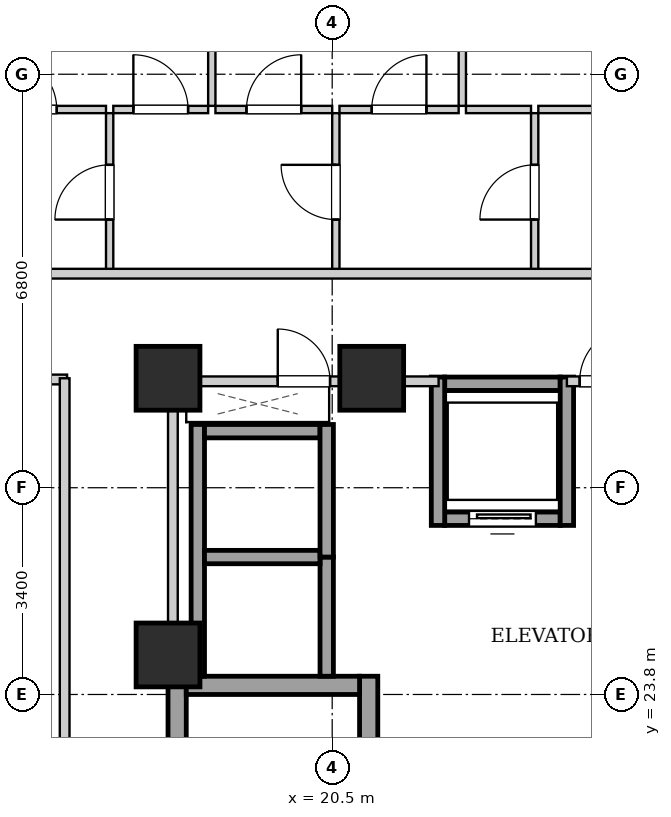
"""IFC4 building model, lengths in metres.
Left out: names, types, materials, properties, quantities, classifications, styles, units other than length and angle.
Written with IfcOpenShell. Run it as: python <this file> out.ifc"""

import sys

from ifc_helpers import new_model, si_unit, direction, frame, frame_2d, origin, origin_2d, place, context, subcontext, project, spatial, rectangle, extrude, element, fill, save


model = new_model("IFC4")
c1 = context("Model", 3, precision=1e-05, world=origin(), true_north=direction((0.0, 1.0)))
c2 = subcontext(c1, "Body", "Model", "MODEL_VIEW")
j1 = project(units=[si_unit("LENGTHUNIT", "METRE"), si_unit("PLANEANGLEUNIT", "RADIAN")], contexts=[c1])
p1 = place(None, origin())
s1 = spatial("IfcSite", under=j1, at=p1, CompositionType="ELEMENT")
p2 = place(p1, origin())
s2 = spatial("IfcBuilding", under=s1, at=p2, CompositionType="ELEMENT")
p3 = place(p2, frame((0.0, 0.0, 75.1)))
s3 = spatial("IfcBuildingStorey", under=s2, at=p3, CompositionType="ELEMENT", Elevation=75.1)
for number, where, z_axis, x_axis in (
    (1, (17.8, 29.0, 0.0), (0.0, 0.0, 1.0), (1.0, 0.0, 0.0)),
    (2, (21.15, 29.0, 0.0), (0.0, 0.0, 1.0), (1.0, 0.0, 0.0)),
    (3, (17.8, 24.45, 0.0), (0.0, 0.0, 1.0), (1.0, 0.0, 0.0)),
):
    element("IfcColumn", number, at=place(p3, frame(where, z_axis=z_axis, x_axis=x_axis)), inside=s3, PredefinedType="COLUMN", context=c2, shape_type="SweptSolid", body=[
        extrude(rectangle(XDim=1.05, YDim=1.05, at=origin_2d()), origin(), (0.0, 0.0, 1.0), 3.2),
    ])
for number, where, z_axis, x_axis in (
    (4, (17.95, 15.1, 0.0), (0.0, 0.0, 1.0), (0.0, 1.0, 0.0)),
    (5, (21.1, 15.1, 0.0), (0.0, 0.0, 1.0), (0.0, 1.0, 0.0)),
):
    element("IfcWall", number, at=place(p3, frame(where, z_axis=z_axis, x_axis=x_axis)), inside=s3, PredefinedType="SHEAR", context=c2, shape_type="SweptSolid", body=[
        extrude(rectangle(XDim=9.0, YDim=0.3, at=frame_2d((4.5, 0.0))), origin(), (0.0, 0.0, 1.0), 2.94),
    ])
p4 = place(p3, frame((18.1, 23.95, 0.0), z_axis=(0.0, 0.0, 1.0), x_axis=(1.0, 0.0, 0.0)))
e6 = element("IfcWall", 6, at=p4, inside=s3, PredefinedType="SHEAR", context=c2, shape_type="SweptSolid", body=[
    extrude(rectangle(XDim=2.85, YDim=0.3, at=frame_2d((1.425, 0.0))), origin(), (0.0, 0.0, 1.0), 2.94),
])
p5 = place(p3, frame((22.35, 26.69, 0.0), z_axis=(0.0, 0.0, 1.0), x_axis=(1.0, 0.0, 0.0)))
e7 = element("IfcWall", 7, at=p5, inside=s3, PredefinedType="SHEAR", context=c2, shape_type="SweptSolid", body=[
    extrude(rectangle(XDim=1.9, YDim=0.22, at=frame_2d((0.95, 0.0))), origin(), (0.0, 0.0, 1.0), 2.94),
])
p6 = place(p5, frame((0.4, 0.0, 0.0)))
e8 = element("IfcOpeningElement", 8, at=p6, cuts=e7, PredefinedType="OPENING", context=c2, shape_type="SweptSolid", body=[
    extrude(rectangle(XDim=1.1, YDim=2.15, at=frame_2d((0.55, 1.075))), frame((0.0, 0.12, 0.0), z_axis=(0.0, -1.0, 0.0), x_axis=(1.0, 0.0, 0.0)), (0.0, 0.0, 1.0), 0.24),
])
p7 = place(p3, frame((22.35, 28.91, 0.0), z_axis=(0.0, 0.0, 1.0), x_axis=(1.0, 0.0, 0.0)))
e9 = element("IfcWall", 9, at=p7, inside=s3, PredefinedType="SHEAR", context=c2, shape_type="SweptSolid", body=[
    extrude(rectangle(XDim=1.9, YDim=0.22, at=frame_2d((0.95, 0.0))), origin(), (0.0, 0.0, 1.0), 2.94),
])
for number, where, z_axis, x_axis in (
    (10, (22.24, 26.58, 0.0), (0.0, 0.0, 1.0), (0.0, 1.0, 0.0)),
    (11, (24.36, 26.58, 0.0), (0.0, 0.0, 1.0), (0.0, 1.0, 0.0)),
):
    element("IfcWall", number, at=place(p3, frame(where, z_axis=z_axis, x_axis=x_axis)), inside=s3, PredefinedType="SHEAR", context=c2, shape_type="SweptSolid", body=[
        extrude(rectangle(XDim=2.44, YDim=0.22, at=frame_2d((1.22, 0.0))), origin(), (0.0, 0.0, 1.0), 2.94),
    ])
p8 = place(p3, frame((18.29, 24.1, 0.0), z_axis=(0.0, 0.0, 1.0), x_axis=(0.0, 1.0, 0.0)))
e12 = element("IfcWall", 12, at=p8, inside=s3, PredefinedType="SHEAR", context=c2, shape_type="SweptSolid", body=[
    extrude(rectangle(XDim=4.14, YDim=0.22, at=frame_2d((2.07, 0.0))), origin(), (0.0, 0.0, 1.0), 2.94),
])
p9 = place(p3, frame((20.41, 24.1, 0.0), z_axis=(0.0, 0.0, 1.0), x_axis=(0.0, 1.0, 0.0)))
e13 = element("IfcWall", 13, at=p9, inside=s3, PredefinedType="SHEAR", context=c2, shape_type="SweptSolid", body=[
    extrude(rectangle(XDim=1.96, YDim=0.22, at=frame_2d((0.98, 0.0))), origin(), (0.0, 0.0, 1.0), 2.94),
])
for number, where, z_axis, x_axis in (
    (14, (18.4, 26.06, 0.0), (0.0, 0.0, 1.0), (1.0, 0.0, 0.0)),
    (15, (18.4, 28.13, 0.0), (0.0, 0.0, 1.0), (1.0, 0.0, 0.0)),
):
    element("IfcWall", number, at=place(p3, frame(where, z_axis=z_axis, x_axis=x_axis)), inside=s3, PredefinedType="SHEAR", context=c2, shape_type="SweptSolid", body=[
        extrude(rectangle(XDim=1.9, YDim=0.22, at=frame_2d((0.95, 0.0))), origin(), (0.0, 0.0, 1.0), 2.94),
    ])
p10 = place(p3, frame((20.41, 26.06, 0.0), z_axis=(0.0, 0.0, 1.0), x_axis=(0.0, 1.0, 0.0)))
e16 = element("IfcWall", 16, at=p10, inside=s3, PredefinedType="SHEAR", context=c2, shape_type="SweptSolid", body=[
    extrude(rectangle(XDim=2.18, YDim=0.22, at=frame_2d((1.09, 0.0))), origin(), (0.0, 0.0, 1.0), 2.94),
])
p11 = place(p3, frame((17.88, 24.12, 0.0), z_axis=(0.0, 0.0, 1.0), x_axis=(0.0, 1.0, 0.0)))
e17 = element("IfcWall", 17, at=p11, inside=s3, PredefinedType="PARTITIONING", context=c2, shape_type="SweptSolid", body=[
    extrude(rectangle(XDim=4.76, YDim=0.16, at=frame_2d((2.38, 0.0))), origin(), (0.0, 0.0, 1.0), 2.94),
])
p12 = place(p3, frame((24.36, 28.95, 0.0), z_axis=(0.0, 0.0, 1.0), x_axis=(1.0, 0.0, 0.0)))
e18 = element("IfcWall", 18, at=p12, inside=s3, PredefinedType="PARTITIONING", context=c2, shape_type="SweptSolid", body=[
    extrude(rectangle(XDim=1.32, YDim=0.16, at=frame_2d((0.66, 0.0))), origin(), (0.0, 0.0, 1.0), 2.309),
])
p13 = place(p12, frame((0.21, 0.0, 0.0)))
e19 = element("IfcOpeningElement", 19, at=p13, cuts=e18, PredefinedType="OPENING", context=c2, shape_type="SweptSolid", body=[
    extrude(rectangle(XDim=0.9, YDim=2.05, at=frame_2d((0.45, 1.025))), frame((0.0, 0.09, 0.0), z_axis=(0.0, -1.0, 0.0), x_axis=(1.0, 0.0, 0.0)), (0.0, 0.0, 1.0), 0.18),
])
p14 = place(p3, frame((17.96, 28.95, 0.0), z_axis=(0.0, 0.0, 1.0), x_axis=(1.0, 0.0, 0.0)))
e20 = element("IfcWall", 20, at=p14, inside=s3, PredefinedType="PARTITIONING", context=c2, shape_type="SweptSolid", body=[
    extrude(rectangle(XDim=4.29, YDim=0.16, at=frame_2d((2.145, 0.0))), origin(), (0.0, 0.0, 1.0), 2.309),
])
p15 = place(p14, frame((1.645, 0.0, 0.0)))
e21 = element("IfcOpeningElement", 21, at=p15, cuts=e20, PredefinedType="OPENING", context=c2, shape_type="SweptSolid", body=[
    extrude(rectangle(XDim=0.86, YDim=2.05, at=frame_2d((0.43, 1.025))), frame((0.0, 0.09, 0.0), z_axis=(0.0, -1.0, 0.0), x_axis=(1.0, 0.0, 0.0)), (0.0, 0.0, 1.0), 0.18),
])
p16 = place(p3, frame((7.78, 28.98, 0.0), z_axis=(0.0, 0.0, 1.0), x_axis=(1.0, 0.0, 0.0)))
e22 = element("IfcWall", 22, at=p16, inside=s3, PredefinedType="PARTITIONING", context=c2, shape_type="SweptSolid", body=[
    extrude(rectangle(XDim=8.36, YDim=0.16, at=frame_2d((4.18, 0.0))), origin(), (0.0, 0.0, 1.0), 2.309),
])
p17 = place(p3, frame((16.84, 30.76, 0.0), z_axis=(0.0, 0.0, 1.0), x_axis=(0.0, 1.0, 0.0)))
e23 = element("IfcWall", 23, at=p17, inside=s3, PredefinedType="PARTITIONING", context=c2, shape_type="SweptSolid", body=[
    extrude(rectangle(XDim=2.6, YDim=0.12, at=frame_2d((1.3, 0.0))), origin(), (0.0, 0.0, 1.0), 2.94),
])
p18 = place(p17, frame((0.85, 0.0, 0.0)))
e24 = element("IfcOpeningElement", 24, at=p18, cuts=e23, PredefinedType="OPENING", context=c2, shape_type="SweptSolid", body=[
    extrude(rectangle(XDim=0.9, YDim=2.05, at=frame_2d((0.45, 1.025))), frame((0.0, 0.07, 0.0), z_axis=(0.0, -1.0, 0.0), x_axis=(1.0, 0.0, 0.0)), (0.0, 0.0, 1.0), 0.14),
])
p19 = place(p3, frame((14.26, 33.42, 0.0), z_axis=(0.0, 0.0, 1.0), x_axis=(1.0, 0.0, 0.0)))
e25 = element("IfcWall", 25, at=p19, inside=s3, PredefinedType="PARTITIONING", context=c2, shape_type="SweptSolid", body=[
    extrude(rectangle(XDim=2.52, YDim=0.12, at=frame_2d((1.26, 0.0))), origin(), (0.0, 0.0, 1.0), 2.94),
])
p20 = place(p19, frame((0.81, 0.0, 0.0)))
e26 = element("IfcOpeningElement", 26, at=p20, cuts=e25, PredefinedType="OPENING", context=c2, shape_type="SweptSolid", body=[
    extrude(rectangle(XDim=0.9, YDim=2.05, at=frame_2d((0.45, 1.025))), frame((0.0, 0.07, 0.0), z_axis=(0.0, -1.0, 0.0), x_axis=(1.0, 0.0, 0.0)), (0.0, 0.0, 1.0), 0.14),
])
p21 = place(p3, frame((20.56, 30.76, 0.0), z_axis=(0.0, 0.0, 1.0), x_axis=(0.0, 1.0, 0.0)))
e27 = element("IfcWall", 27, at=p21, inside=s3, PredefinedType="PARTITIONING", context=c2, shape_type="SweptSolid", body=[
    extrude(rectangle(XDim=2.6, YDim=0.12, at=frame_2d((1.3, 0.0))), origin(), (0.0, 0.0, 1.0), 2.94),
])
p22 = place(p21, frame((0.85, 0.0, 0.0)))
e28 = element("IfcOpeningElement", 28, at=p22, cuts=e27, PredefinedType="OPENING", context=c2, shape_type="SweptSolid", body=[
    extrude(rectangle(XDim=0.9, YDim=2.05, at=frame_2d((0.45, 1.025))), frame((0.0, 0.07, 0.0), z_axis=(0.0, -1.0, 0.0), x_axis=(1.0, 0.0, 0.0)), (0.0, 0.0, 1.0), 0.14),
])
p23 = place(p3, frame((16.9, 33.42, 0.0), z_axis=(0.0, 0.0, 1.0), x_axis=(1.0, 0.0, 0.0)))
e29 = element("IfcWall", 29, at=p23, inside=s3, PredefinedType="PARTITIONING", context=c2, shape_type="SweptSolid", body=[
    extrude(rectangle(XDim=1.56, YDim=0.12, at=frame_2d((0.78, 0.0))), origin(), (0.0, 0.0, 1.0), 2.94),
])
p24 = place(p23, frame((0.33, 0.0, 0.0)))
e30 = element("IfcOpeningElement", 30, at=p24, cuts=e29, PredefinedType="OPENING", context=c2, shape_type="SweptSolid", body=[
    extrude(rectangle(XDim=0.9, YDim=2.05, at=frame_2d((0.45, 1.025))), frame((0.0, 0.07, 0.0), z_axis=(0.0, -1.0, 0.0), x_axis=(1.0, 0.0, 0.0)), (0.0, 0.0, 1.0), 0.14),
])
p25 = place(p3, frame((18.58, 33.42, 0.0), z_axis=(0.0, 0.0, 1.0), x_axis=(1.0, 0.0, 0.0)))
e31 = element("IfcWall", 31, at=p25, inside=s3, PredefinedType="PARTITIONING", context=c2, shape_type="SweptSolid", body=[
    extrude(rectangle(XDim=1.92, YDim=0.12, at=frame_2d((0.96, 0.0))), origin(), (0.0, 0.0, 1.0), 2.94),
])
p26 = place(p25, frame((0.51, 0.0, 0.0)))
e32 = element("IfcOpeningElement", 32, at=p26, cuts=e31, PredefinedType="OPENING", context=c2, shape_type="SweptSolid", body=[
    extrude(rectangle(XDim=0.9, YDim=2.05, at=frame_2d((0.45, 1.025))), frame((0.0, 0.07, 0.0), z_axis=(0.0, -1.0, 0.0), x_axis=(1.0, 0.0, 0.0)), (0.0, 0.0, 1.0), 0.14),
])
p27 = place(p3, frame((23.83, 30.76, 0.0), z_axis=(0.0, 0.0, 1.0), x_axis=(0.0, 1.0, 0.0)))
e33 = element("IfcWall", 33, at=p27, inside=s3, PredefinedType="PARTITIONING", context=c2, shape_type="SweptSolid", body=[
    extrude(rectangle(XDim=2.6, YDim=0.12, at=frame_2d((1.3, 0.0))), origin(), (0.0, 0.0, 1.0), 2.94),
])
p28 = place(p27, frame((0.85, 0.0, 0.0)))
e34 = element("IfcOpeningElement", 34, at=p28, cuts=e33, PredefinedType="OPENING", context=c2, shape_type="SweptSolid", body=[
    extrude(rectangle(XDim=0.9, YDim=2.05, at=frame_2d((0.45, 1.025))), frame((0.0, 0.07, 0.0), z_axis=(0.0, -1.0, 0.0), x_axis=(1.0, 0.0, 0.0)), (0.0, 0.0, 1.0), 0.14),
])
p29 = place(p3, frame((20.62, 33.42, 0.0), z_axis=(0.0, 0.0, 1.0), x_axis=(1.0, 0.0, 0.0)))
e35 = element("IfcWall", 35, at=p29, inside=s3, PredefinedType="PARTITIONING", context=c2, shape_type="SweptSolid", body=[
    extrude(rectangle(XDim=1.96, YDim=0.12, at=frame_2d((0.98, 0.0))), origin(), (0.0, 0.0, 1.0), 2.94),
])
p30 = place(p29, frame((0.53, 0.0, 0.0)))
e36 = element("IfcOpeningElement", 36, at=p30, cuts=e35, PredefinedType="OPENING", context=c2, shape_type="SweptSolid", body=[
    extrude(rectangle(XDim=0.9, YDim=2.05, at=frame_2d((0.45, 1.025))), frame((0.0, 0.07, 0.0), z_axis=(0.0, -1.0, 0.0), x_axis=(1.0, 0.0, 0.0)), (0.0, 0.0, 1.0), 0.14),
])
p31 = place(p3, frame((22.7, 33.42, 0.0), z_axis=(0.0, 0.0, 1.0), x_axis=(1.0, 0.0, 0.0)))
e37 = element("IfcWall", 37, at=p31, inside=s3, PredefinedType="PARTITIONING", context=c2, shape_type="SweptSolid", body=[
    extrude(rectangle(XDim=1.07, YDim=0.12, at=frame_2d((0.535, 0.0))), origin(), (0.0, 0.0, 1.0), 2.94),
])
p32 = place(p3, frame((23.89, 33.42, 0.0), z_axis=(0.0, 0.0, 1.0), x_axis=(1.0, 0.0, 0.0)))
e38 = element("IfcWall", 38, at=p32, inside=s3, PredefinedType="PARTITIONING", context=c2, shape_type="SweptSolid", body=[
    extrude(rectangle(XDim=3.6, YDim=0.12, at=frame_2d((1.8, 0.0))), origin(), (0.0, 0.0, 1.0), 2.94),
])
p33 = place(p32, frame((1.35, 0.0, 0.0)))
e39 = element("IfcOpeningElement", 39, at=p33, cuts=e38, PredefinedType="OPENING", context=c2, shape_type="SweptSolid", body=[
    extrude(rectangle(XDim=0.9, YDim=2.05, at=frame_2d((0.45, 1.025))), frame((0.0, 0.07, 0.0), z_axis=(0.0, -1.0, 0.0), x_axis=(1.0, 0.0, 0.0)), (0.0, 0.0, 1.0), 0.14),
])
p34 = place(p3, frame((18.52, 33.48, 0.0), z_axis=(0.0, 0.0, 1.0), x_axis=(0.0, 1.0, 0.0)))
e40 = element("IfcWall", 40, at=p34, inside=s3, PredefinedType="PARTITIONING", context=c2, shape_type="SweptSolid", body=[
    extrude(rectangle(XDim=9.54, YDim=0.12, at=frame_2d((4.77, 0.0))), origin(), (0.0, 0.0, 1.0), 2.94),
])
p35 = place(p34, frame((4.305, 0.0, 0.0)))
e41 = element("IfcOpeningElement", 41, at=p35, cuts=e40, PredefinedType="OPENING", context=c2, shape_type="SweptSolid", body=[
    extrude(rectangle(XDim=0.9, YDim=2.05, at=frame_2d((0.45, 1.025))), frame((0.0, 0.07, 0.0), z_axis=(0.0, -1.0, 0.0), x_axis=(1.0, 0.0, 0.0)), (0.0, 0.0, 1.0), 0.14),
])
p36 = place(p3, frame((22.64, 33.48, 0.0), z_axis=(0.0, 0.0, 1.0), x_axis=(0.0, 1.0, 0.0)))
e42 = element("IfcWall", 42, at=p36, inside=s3, PredefinedType="PARTITIONING", context=c2, shape_type="SweptSolid", body=[
    extrude(rectangle(XDim=9.54, YDim=0.12, at=frame_2d((4.77, 0.0))), origin(), (0.0, 0.0, 1.0), 2.94),
])
p37 = place(p36, frame((4.305, 0.0, 0.0)))
e43 = element("IfcOpeningElement", 43, at=p37, cuts=e42, PredefinedType="OPENING", context=c2, shape_type="SweptSolid", body=[
    extrude(rectangle(XDim=0.9, YDim=2.05, at=frame_2d((0.45, 1.025))), frame((0.0, 0.07, 0.0), z_axis=(0.0, -1.0, 0.0), x_axis=(1.0, 0.0, 0.0)), (0.0, 0.0, 1.0), 0.14),
])
p38 = place(p3, frame((10.05, 30.72, 0.0), z_axis=(0.0, 0.0, 1.0), x_axis=(1.0, 0.0, 0.0)))
e44 = element("IfcWall", 44, at=p38, inside=s3, PredefinedType="PARTITIONING", context=c2, shape_type="SweptSolid", body=[
    extrude(rectangle(XDim=30.8, YDim=0.16, at=frame_2d((15.4, 0.0))), origin(), (0.0, 0.0, 1.0), 2.94),
])
p39 = place(p38, frame((4.165, 0.0, 0.0)))
e45 = element("IfcOpeningElement", 45, at=p39, cuts=e44, PredefinedType="OPENING", context=c2, shape_type="SweptSolid", body=[
    extrude(rectangle(XDim=0.95, YDim=2.1, at=frame_2d((0.475, 1.05))), frame((0.0, 0.09, 0.0), z_axis=(0.0, -1.0, 0.0), x_axis=(1.0, 0.0, 0.0)), (0.0, 0.0, 1.0), 0.18),
])
p40 = place(p3, frame((16.1, 15.07, 0.0), z_axis=(0.0, 0.0, 1.0), x_axis=(0.0, 1.0, 0.0)))
e46 = element("IfcWall", 46, at=p40, inside=s3, PredefinedType="PARTITIONING", context=c2, shape_type="SweptSolid", body=[
    extrude(rectangle(XDim=13.93, YDim=0.16, at=frame_2d((6.965, 0.0))), origin(), (0.0, 0.0, 1.0), 2.94),
])
p41 = place(p40, frame((4.385, 0.0, 0.0)))
e47 = element("IfcOpeningElement", 47, at=p41, cuts=e46, PredefinedType="OPENING", context=c2, shape_type="SweptSolid", body=[
    extrude(rectangle(XDim=0.95, YDim=2.1, at=frame_2d((0.475, 1.05))), frame((0.0, 0.09, 0.0), z_axis=(0.0, -1.0, 0.0), x_axis=(1.0, 0.0, 0.0)), (0.0, 0.0, 1.0), 0.18),
])
p42 = place(p6, origin())
e48 = element("IfcDoor", 48, at=p42, inside=s3, OperationType="SLIDING_TO_LEFT", PredefinedType="DOOR", context=c2, shape_type="SweptSolid", body=[
    extrude(rectangle(XDim=1.1, YDim=2.15, at=frame_2d((0.55, 1.075))), frame((0.0, 0.025, 0.0), z_axis=(0.0, -1.0, 0.0), x_axis=(1.0, 0.0, 0.0)), (0.0, 0.0, 1.0), 0.05),
])
fill(e8, e48)
p43 = place(p13, origin())
e49 = element("IfcDoor", 49, at=p43, inside=s3, OperationType="SINGLE_SWING_RIGHT", PredefinedType="DOOR", context=c2, shape_type="SweptSolid", body=[
    extrude(rectangle(XDim=0.9, YDim=2.05, at=frame_2d((0.45, 1.025))), frame((0.0, 0.025, 0.0), z_axis=(0.0, -1.0, 0.0), x_axis=(1.0, 0.0, 0.0)), (0.0, 0.0, 1.0), 0.05),
])
fill(e19, e49)
p44 = place(p15, origin())
e50 = element("IfcDoor", 50, at=p44, inside=s3, OperationType="SINGLE_SWING_LEFT", PredefinedType="DOOR", context=c2, shape_type="SweptSolid", body=[
    extrude(rectangle(XDim=0.86, YDim=2.05, at=frame_2d((0.43, 1.025))), frame((0.0, 0.025, 0.0), z_axis=(0.0, -1.0, 0.0), x_axis=(1.0, 0.0, 0.0)), (0.0, 0.0, 1.0), 0.05),
])
fill(e21, e50)
p45 = place(p18, origin())
e51 = element("IfcDoor", 51, at=p45, inside=s3, OperationType="SINGLE_SWING_LEFT", PredefinedType="DOOR", context=c2, shape_type="SweptSolid", body=[
    extrude(rectangle(XDim=0.9, YDim=2.05, at=frame_2d((0.45, 1.025))), frame((0.0, 0.025, 0.0), z_axis=(0.0, -1.0, 0.0), x_axis=(1.0, 0.0, 0.0)), (0.0, 0.0, 1.0), 0.05),
])
fill(e24, e51)
p46 = place(p20, origin())
e52 = element("IfcDoor", 52, at=p46, inside=s3, OperationType="SINGLE_SWING_LEFT", PredefinedType="DOOR", context=c2, shape_type="SweptSolid", body=[
    extrude(rectangle(XDim=0.9, YDim=2.05, at=frame_2d((0.45, 1.025))), frame((0.0, 0.025, 0.0), z_axis=(0.0, -1.0, 0.0), x_axis=(1.0, 0.0, 0.0)), (0.0, 0.0, 1.0), 0.05),
])
fill(e26, e52)
p47 = place(p22, origin())
e53 = element("IfcDoor", 53, at=p47, inside=s3, OperationType="SINGLE_SWING_RIGHT", PredefinedType="DOOR", context=c2, shape_type="SweptSolid", body=[
    extrude(rectangle(XDim=0.9, YDim=2.05, at=frame_2d((0.45, 1.025))), frame((0.0, 0.025, 0.0), z_axis=(0.0, -1.0, 0.0), x_axis=(1.0, 0.0, 0.0)), (0.0, 0.0, 1.0), 0.05),
])
fill(e28, e53)
p48 = place(p24, origin())
e54 = element("IfcDoor", 54, at=p48, inside=s3, OperationType="SINGLE_SWING_LEFT", PredefinedType="DOOR", context=c2, shape_type="SweptSolid", body=[
    extrude(rectangle(XDim=0.9, YDim=2.05, at=frame_2d((0.45, 1.025))), frame((0.0, 0.025, 0.0), z_axis=(0.0, -1.0, 0.0), x_axis=(1.0, 0.0, 0.0)), (0.0, 0.0, 1.0), 0.05),
])
fill(e30, e54)
p49 = place(p26, origin())
e55 = element("IfcDoor", 55, at=p49, inside=s3, OperationType="SINGLE_SWING_RIGHT", PredefinedType="DOOR", context=c2, shape_type="SweptSolid", body=[
    extrude(rectangle(XDim=0.9, YDim=2.05, at=frame_2d((0.45, 1.025))), frame((0.0, 0.025, 0.0), z_axis=(0.0, -1.0, 0.0), x_axis=(1.0, 0.0, 0.0)), (0.0, 0.0, 1.0), 0.05),
])
fill(e32, e55)
p50 = place(p28, origin())
e56 = element("IfcDoor", 56, at=p50, inside=s3, OperationType="SINGLE_SWING_LEFT", PredefinedType="DOOR", context=c2, shape_type="SweptSolid", body=[
    extrude(rectangle(XDim=0.9, YDim=2.05, at=frame_2d((0.45, 1.025))), frame((0.0, 0.025, 0.0), z_axis=(0.0, -1.0, 0.0), x_axis=(1.0, 0.0, 0.0)), (0.0, 0.0, 1.0), 0.05),
])
fill(e34, e56)
p51 = place(p30, origin())
e57 = element("IfcDoor", 57, at=p51, inside=s3, OperationType="SINGLE_SWING_RIGHT", PredefinedType="DOOR", context=c2, shape_type="SweptSolid", body=[
    extrude(rectangle(XDim=0.9, YDim=2.05, at=frame_2d((0.45, 1.025))), frame((0.0, 0.025, 0.0), z_axis=(0.0, -1.0, 0.0), x_axis=(1.0, 0.0, 0.0)), (0.0, 0.0, 1.0), 0.05),
])
fill(e36, e57)
save(model, sys.argv[1])
